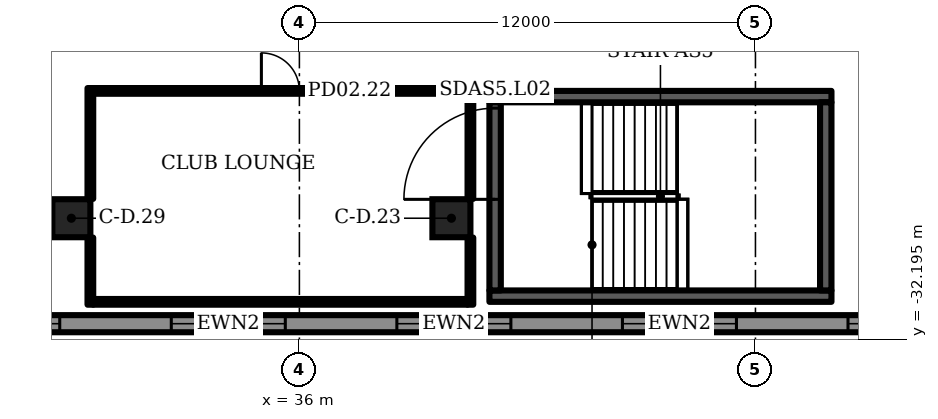
"""IFC4 building model, lengths in metres.
Left out: names, types, materials, properties, quantities, classifications, styles, units other than length and angle.
Written with IfcOpenShell. Run it as: python <this file> out.ifc"""

import sys

from ifc_helpers import new_model, si_unit, direction, frame, frame_2d, origin, origin_2d, place, context, subcontext, project, spatial, rectangle, extrude, element, fill, save


model = new_model("IFC4")
c1 = context("Model", 3, precision=1e-05, world=origin(), true_north=direction((0.0, 1.0)))
c2 = subcontext(c1, "Body", "Model", "MODEL_VIEW")
j1 = project(units=[si_unit("LENGTHUNIT", "METRE"), si_unit("PLANEANGLEUNIT", "RADIAN")], contexts=[c1])
p1 = place(None, origin())
s1 = spatial("IfcSite", under=j1, at=p1, CompositionType="ELEMENT")
p2 = place(p1, origin())
s2 = spatial("IfcBuilding", under=s1, at=p2, CompositionType="ELEMENT")
p3 = place(p2, frame((0.0, 0.0, 15.0)))
s3 = spatial("IfcBuildingStorey", under=s2, at=p3, CompositionType="ELEMENT", Elevation=15.0)
for number, where, z_axis, x_axis in (
    (1, (40.0, -29.0, 0.0), (0.0, 0.0, 1.0), (1.0, 0.0, 0.0)),
    (2, (30.0, -29.0, 0.0), (0.0, 0.0, 1.0), (1.0, 0.0, 0.0)),
):
    element("IfcColumn", number, at=place(p3, frame(where, z_axis=z_axis, x_axis=x_axis)), inside=s3, PredefinedType="COLUMN", context=c2, shape_type="SweptSolid", body=[
        extrude(rectangle(XDim=1.0, YDim=1.0, at=origin_2d()), origin(), (0.0, 0.0, 1.0), 6.5),
    ])
p4 = place(p3, frame((-4.45, -31.775, 0.0), z_axis=(0.0, 0.0, 1.0), x_axis=(1.0, 0.0, 0.0)))
e3 = element("IfcWall", 3, at=p4, inside=s3, PredefinedType="SOLIDWALL", context=c2, shape_type="SweptSolid", body=[
    extrude(rectangle(XDim=100.9, YDim=0.45, at=frame_2d((50.45, 0.0))), origin(), (0.0, 0.0, 1.0), 6.2),
])
p5 = place(p4, frame((1.468, 0.0, 1.0)))
e4 = element("IfcOpeningElement", 4, at=p5, cuts=e3, PredefinedType="OPENING", context=c2, shape_type="SweptSolid", body=[
    extrude(rectangle(XDim=3.0, YDim=4.2, at=frame_2d((1.5, 2.1))), frame((0.0, 0.235, 0.0), z_axis=(0.0, -1.0, 0.0), x_axis=(1.0, 0.0, 0.0)), (0.0, 0.0, 1.0), 0.47),
])
p6 = place(p4, frame((7.403, 0.0, 1.0)))
e5 = element("IfcOpeningElement", 5, at=p6, cuts=e3, PredefinedType="OPENING", context=c2, shape_type="SweptSolid", body=[
    extrude(rectangle(XDim=3.0, YDim=4.2, at=frame_2d((1.5, 2.1))), frame((0.0, 0.235, 0.0), z_axis=(0.0, -1.0, 0.0), x_axis=(1.0, 0.0, 0.0)), (0.0, 0.0, 1.0), 0.47),
])
p7 = place(p4, frame((13.338, 0.0, 1.0)))
e6 = element("IfcOpeningElement", 6, at=p7, cuts=e3, PredefinedType="OPENING", context=c2, shape_type="SweptSolid", body=[
    extrude(rectangle(XDim=3.0, YDim=4.2, at=frame_2d((1.5, 2.1))), frame((0.0, 0.235, 0.0), z_axis=(0.0, -1.0, 0.0), x_axis=(1.0, 0.0, 0.0)), (0.0, 0.0, 1.0), 0.47),
])
p8 = place(p4, frame((19.273, 0.0, 1.0)))
e7 = element("IfcOpeningElement", 7, at=p8, cuts=e3, PredefinedType="OPENING", context=c2, shape_type="SweptSolid", body=[
    extrude(rectangle(XDim=3.0, YDim=4.2, at=frame_2d((1.5, 2.1))), frame((0.0, 0.235, 0.0), z_axis=(0.0, -1.0, 0.0), x_axis=(1.0, 0.0, 0.0)), (0.0, 0.0, 1.0), 0.47),
])
p9 = place(p4, frame((25.209, 0.0, 1.0)))
e8 = element("IfcOpeningElement", 8, at=p9, cuts=e3, PredefinedType="OPENING", context=c2, shape_type="SweptSolid", body=[
    extrude(rectangle(XDim=3.0, YDim=4.2, at=frame_2d((1.5, 2.1))), frame((0.0, 0.235, 0.0), z_axis=(0.0, -1.0, 0.0), x_axis=(1.0, 0.0, 0.0)), (0.0, 0.0, 1.0), 0.47),
])
p10 = place(p4, frame((31.144, 0.0, 1.0)))
e9 = element("IfcOpeningElement", 9, at=p10, cuts=e3, PredefinedType="OPENING", context=c2, shape_type="SweptSolid", body=[
    extrude(rectangle(XDim=3.0, YDim=4.2, at=frame_2d((1.5, 2.1))), frame((0.0, 0.235, 0.0), z_axis=(0.0, -1.0, 0.0), x_axis=(1.0, 0.0, 0.0)), (0.0, 0.0, 1.0), 0.47),
])
p11 = place(p4, frame((37.079, 0.0, 1.0)))
e10 = element("IfcOpeningElement", 10, at=p11, cuts=e3, PredefinedType="OPENING", context=c2, shape_type="SweptSolid", body=[
    extrude(rectangle(XDim=3.0, YDim=4.2, at=frame_2d((1.5, 2.1))), frame((0.0, 0.235, 0.0), z_axis=(0.0, -1.0, 0.0), x_axis=(1.0, 0.0, 0.0)), (0.0, 0.0, 1.0), 0.47),
])
p12 = place(p4, frame((43.015, 0.0, 1.0)))
e11 = element("IfcOpeningElement", 11, at=p12, cuts=e3, PredefinedType="OPENING", context=c2, shape_type="SweptSolid", body=[
    extrude(rectangle(XDim=3.0, YDim=4.2, at=frame_2d((1.5, 2.1))), frame((0.0, 0.235, 0.0), z_axis=(0.0, -1.0, 0.0), x_axis=(1.0, 0.0, 0.0)), (0.0, 0.0, 1.0), 0.47),
])
p13 = place(p4, frame((48.95, 0.0, 1.0)))
e12 = element("IfcOpeningElement", 12, at=p13, cuts=e3, PredefinedType="OPENING", context=c2, shape_type="SweptSolid", body=[
    extrude(rectangle(XDim=3.0, YDim=4.2, at=frame_2d((1.5, 2.1))), frame((0.0, 0.235, 0.0), z_axis=(0.0, -1.0, 0.0), x_axis=(1.0, 0.0, 0.0)), (0.0, 0.0, 1.0), 0.47),
])
p14 = place(p4, frame((54.885, 0.0, 1.0)))
e13 = element("IfcOpeningElement", 13, at=p14, cuts=e3, PredefinedType="OPENING", context=c2, shape_type="SweptSolid", body=[
    extrude(rectangle(XDim=3.0, YDim=4.2, at=frame_2d((1.5, 2.1))), frame((0.0, 0.235, 0.0), z_axis=(0.0, -1.0, 0.0), x_axis=(1.0, 0.0, 0.0)), (0.0, 0.0, 1.0), 0.47),
])
p15 = place(p4, frame((60.821, 0.0, 1.0)))
e14 = element("IfcOpeningElement", 14, at=p15, cuts=e3, PredefinedType="OPENING", context=c2, shape_type="SweptSolid", body=[
    extrude(rectangle(XDim=3.0, YDim=4.2, at=frame_2d((1.5, 2.1))), frame((0.0, 0.235, 0.0), z_axis=(0.0, -1.0, 0.0), x_axis=(1.0, 0.0, 0.0)), (0.0, 0.0, 1.0), 0.47),
])
p16 = place(p4, frame((66.756, 0.0, 1.0)))
e15 = element("IfcOpeningElement", 15, at=p16, cuts=e3, PredefinedType="OPENING", context=c2, shape_type="SweptSolid", body=[
    extrude(rectangle(XDim=3.0, YDim=4.2, at=frame_2d((1.5, 2.1))), frame((0.0, 0.235, 0.0), z_axis=(0.0, -1.0, 0.0), x_axis=(1.0, 0.0, 0.0)), (0.0, 0.0, 1.0), 0.47),
])
p17 = place(p4, frame((72.691, 0.0, 1.0)))
e16 = element("IfcOpeningElement", 16, at=p17, cuts=e3, PredefinedType="OPENING", context=c2, shape_type="SweptSolid", body=[
    extrude(rectangle(XDim=3.0, YDim=4.2, at=frame_2d((1.5, 2.1))), frame((0.0, 0.235, 0.0), z_axis=(0.0, -1.0, 0.0), x_axis=(1.0, 0.0, 0.0)), (0.0, 0.0, 1.0), 0.47),
])
p18 = place(p4, frame((78.626, 0.0, 1.0)))
e17 = element("IfcOpeningElement", 17, at=p18, cuts=e3, PredefinedType="OPENING", context=c2, shape_type="SweptSolid", body=[
    extrude(rectangle(XDim=3.0, YDim=4.2, at=frame_2d((1.5, 2.1))), frame((0.0, 0.235, 0.0), z_axis=(0.0, -1.0, 0.0), x_axis=(1.0, 0.0, 0.0)), (0.0, 0.0, 1.0), 0.47),
])
p19 = place(p4, frame((84.562, 0.0, 1.0)))
e18 = element("IfcOpeningElement", 18, at=p19, cuts=e3, PredefinedType="OPENING", context=c2, shape_type="SweptSolid", body=[
    extrude(rectangle(XDim=3.0, YDim=4.2, at=frame_2d((1.5, 2.1))), frame((0.0, 0.235, 0.0), z_axis=(0.0, -1.0, 0.0), x_axis=(1.0, 0.0, 0.0)), (0.0, 0.0, 1.0), 0.47),
])
p20 = place(p4, frame((90.497, 0.0, 1.0)))
e19 = element("IfcOpeningElement", 19, at=p20, cuts=e3, PredefinedType="OPENING", context=c2, shape_type="SweptSolid", body=[
    extrude(rectangle(XDim=3.0, YDim=4.2, at=frame_2d((1.5, 2.1))), frame((0.0, 0.235, 0.0), z_axis=(0.0, -1.0, 0.0), x_axis=(1.0, 0.0, 0.0)), (0.0, 0.0, 1.0), 0.47),
])
p21 = place(p4, frame((96.432, 0.0, 1.0)))
e20 = element("IfcOpeningElement", 20, at=p21, cuts=e3, PredefinedType="OPENING", context=c2, shape_type="SweptSolid", body=[
    extrude(rectangle(XDim=3.0, YDim=4.2, at=frame_2d((1.5, 2.1))), frame((0.0, 0.235, 0.0), z_axis=(0.0, -1.0, 0.0), x_axis=(1.0, 0.0, 0.0)), (0.0, 0.0, 1.0), 0.47),
])
p22 = place(p3, frame((30.575, -31.2, 0.0), z_axis=(0.0, 0.0, 1.0), x_axis=(1.0, 0.0, 0.0)))
e21 = element("IfcWall", 21, at=p22, inside=s3, PredefinedType="PARTITIONING", context=c2, shape_type="SweptSolid", body=[
    extrude(rectangle(XDim=9.85, YDim=0.15, at=frame_2d((4.925, 0.0))), origin(), (0.0, 0.0, 1.0), 6.2),
])
p23 = place(p3, frame((40.5, -31.275, 0.0), z_axis=(0.0, 0.0, 1.0), x_axis=(0.0, 1.0, 0.0)))
e22 = element("IfcWall", 22, at=p23, inside=s3, PredefinedType="PARTITIONING", context=c2, shape_type="SweptSolid", body=[
    extrude(rectangle(XDim=1.765, YDim=0.15, at=frame_2d((0.882, 0.0))), origin(), (0.0, 0.0, 1.0), 6.2),
])
p24 = place(p3, frame((40.5, -28.49, 0.0), z_axis=(0.0, 0.0, 1.0), x_axis=(0.0, 1.0, 0.0)))
e23 = element("IfcWall", 23, at=p24, inside=s3, PredefinedType="PARTITIONING", context=c2, shape_type="SweptSolid", body=[
    extrude(rectangle(XDim=2.915, YDim=0.15, at=frame_2d((1.458, 0.0))), origin(), (0.0, 0.0, 1.0), 6.2),
])
p25 = place(p3, frame((30.575, -25.65, 0.0), z_axis=(0.0, 0.0, 1.0), x_axis=(1.0, 0.0, 0.0)))
e24 = element("IfcWall", 24, at=p25, inside=s3, PredefinedType="PARTITIONING", context=c2, shape_type="SweptSolid", body=[
    extrude(rectangle(XDim=9.85, YDim=0.15, at=frame_2d((4.925, 0.0))), origin(), (0.0, 0.0, 1.0), 6.2),
])
p26 = place(p25, frame((4.425, 0.0, 0.0)))
e25 = element("IfcOpeningElement", 25, at=p26, cuts=e24, PredefinedType="OPENING", context=c2, shape_type="SweptSolid", body=[
    extrude(rectangle(XDim=1.0, YDim=2.1, at=frame_2d((0.5, 1.05))), frame((0.0, 0.085, 0.0), z_axis=(0.0, -1.0, 0.0), x_axis=(1.0, 0.0, 0.0)), (0.0, 0.0, 1.0), 0.17),
])
p27 = place(p3, frame((30.5, -31.275, 0.0), z_axis=(0.0, 0.0, 1.0), x_axis=(0.0, 1.0, 0.0)))
e26 = element("IfcWall", 26, at=p27, inside=s3, PredefinedType="PARTITIONING", context=c2, shape_type="SweptSolid", body=[
    extrude(rectangle(XDim=1.765, YDim=0.15, at=frame_2d((0.882, 0.0))), origin(), (0.0, 0.0, 1.0), 6.2),
])
p28 = place(p3, frame((30.5, -28.49, 0.0), z_axis=(0.0, 0.0, 1.0), x_axis=(0.0, 1.0, 0.0)))
e27 = element("IfcWall", 27, at=p28, inside=s3, PredefinedType="PARTITIONING", context=c2, shape_type="SweptSolid", body=[
    extrude(rectangle(XDim=2.915, YDim=0.15, at=frame_2d((1.458, 0.0))), origin(), (0.0, 0.0, 1.0), 6.2),
])
for number, where, z_axis, x_axis in (
    (28, (41.0, -31.05, 0.0), (0.0, 0.0, 1.0), (1.0, 0.0, 0.0)),
    (29, (41.0, -25.8, 0.0), (0.0, 0.0, 1.0), (1.0, 0.0, 0.0)),
):
    element("IfcWall", number, at=place(p3, frame(where, z_axis=z_axis, x_axis=x_axis)), inside=s3, PredefinedType="SHEAR", context=c2, shape_type="SweptSolid", body=[
        extrude(rectangle(XDim=9.0, YDim=0.3, at=frame_2d((4.5, 0.0))), origin(), (0.0, 0.0, 1.0), 6.2),
    ])
p29 = place(p3, frame((41.15, -30.9, 0.0), z_axis=(0.0, 0.0, 1.0), x_axis=(0.0, 1.0, 0.0)))
e30 = element("IfcWall", 30, at=p29, inside=s3, PredefinedType="SHEAR", context=c2, shape_type="SweptSolid", body=[
    extrude(rectangle(XDim=4.95, YDim=0.3, at=frame_2d((2.475, 0.0))), origin(), (0.0, 0.0, 1.0), 6.2),
])
p30 = place(p29, frame((2.397, 0.0, 0.0)))
e31 = element("IfcOpeningElement", 31, at=p30, cuts=e30, PredefinedType="OPENING", context=c2, shape_type="SweptSolid", body=[
    extrude(rectangle(XDim=2.4, YDim=2.1, at=frame_2d((1.2, 1.05))), frame((0.0, 0.16, 0.0), z_axis=(0.0, -1.0, 0.0), x_axis=(1.0, 0.0, 0.0)), (0.0, 0.0, 1.0), 0.32),
])
p31 = place(p3, frame((49.85, -30.9, 0.0), z_axis=(0.0, 0.0, 1.0), x_axis=(0.0, 1.0, 0.0)))
e32 = element("IfcWall", 32, at=p31, inside=s3, PredefinedType="SHEAR", context=c2, shape_type="SweptSolid", body=[
    extrude(rectangle(XDim=4.95, YDim=0.3, at=frame_2d((2.475, 0.0))), origin(), (0.0, 0.0, 1.0), 6.2),
])
p32 = place(p10, origin())
e33 = element("IfcWindow", 33, at=p32, inside=s3, PartitioningType="SINGLE_PANEL", PredefinedType="WINDOW", context=c2, shape_type="SweptSolid", body=[
    extrude(rectangle(XDim=3.0, YDim=4.2, at=frame_2d((1.5, 2.1))), frame((0.0, 0.105, 0.0), z_axis=(0.0, -1.0, 0.0), x_axis=(1.0, 0.0, 0.0)), (0.0, 0.0, 1.0), 0.06),
])
fill(e9, e33)
p33 = place(p11, origin())
e34 = element("IfcWindow", 34, at=p33, inside=s3, PartitioningType="SINGLE_PANEL", PredefinedType="WINDOW", context=c2, shape_type="SweptSolid", body=[
    extrude(rectangle(XDim=3.0, YDim=4.2, at=frame_2d((1.5, 2.1))), frame((0.0, 0.105, 0.0), z_axis=(0.0, -1.0, 0.0), x_axis=(1.0, 0.0, 0.0)), (0.0, 0.0, 1.0), 0.06),
])
fill(e10, e34)
p34 = place(p12, origin())
e35 = element("IfcWindow", 35, at=p34, inside=s3, PartitioningType="SINGLE_PANEL", PredefinedType="WINDOW", context=c2, shape_type="SweptSolid", body=[
    extrude(rectangle(XDim=3.0, YDim=4.2, at=frame_2d((1.5, 2.1))), frame((0.0, 0.105, 0.0), z_axis=(0.0, -1.0, 0.0), x_axis=(1.0, 0.0, 0.0)), (0.0, 0.0, 1.0), 0.06),
])
fill(e11, e35)
p35 = place(p13, origin())
e36 = element("IfcWindow", 36, at=p35, inside=s3, PartitioningType="SINGLE_PANEL", PredefinedType="WINDOW", context=c2, shape_type="SweptSolid", body=[
    extrude(rectangle(XDim=3.0, YDim=4.2, at=frame_2d((1.5, 2.1))), frame((0.0, 0.105, 0.0), z_axis=(0.0, -1.0, 0.0), x_axis=(1.0, 0.0, 0.0)), (0.0, 0.0, 1.0), 0.06),
])
fill(e12, e36)
p36 = place(p14, origin())
e37 = element("IfcWindow", 37, at=p36, inside=s3, PartitioningType="SINGLE_PANEL", PredefinedType="WINDOW", context=c2, shape_type="SweptSolid", body=[
    extrude(rectangle(XDim=3.0, YDim=4.2, at=frame_2d((1.5, 2.1))), frame((0.0, 0.105, 0.0), z_axis=(0.0, -1.0, 0.0), x_axis=(1.0, 0.0, 0.0)), (0.0, 0.0, 1.0), 0.06),
])
fill(e13, e37)
p37 = place(p26, origin())
e38 = element("IfcDoor", 38, at=p37, inside=s3, OperationType="SINGLE_SWING_LEFT", PredefinedType="DOOR", context=c2, shape_type="SweptSolid", body=[
    extrude(rectangle(XDim=1.0, YDim=2.1, at=frame_2d((0.5, 1.05))), frame((0.0, 0.025, 0.0), z_axis=(0.0, -1.0, 0.0), x_axis=(1.0, 0.0, 0.0)), (0.0, 0.0, 1.0), 0.05),
])
fill(e25, e38)
p38 = place(p30, origin())
e39 = element("IfcDoor", 39, at=p38, inside=s3, OperationType="DOUBLE_DOOR_SINGLE_SWING", PredefinedType="DOOR", context=c2, shape_type="SweptSolid", body=[
    extrude(rectangle(XDim=2.4, YDim=2.1, at=frame_2d((1.2, 1.05))), frame((0.0, 0.025, 0.0), z_axis=(0.0, -1.0, 0.0), x_axis=(1.0, 0.0, 0.0)), (0.0, 0.0, 1.0), 0.05),
])
fill(e31, e39)
save(model, sys.argv[1])
